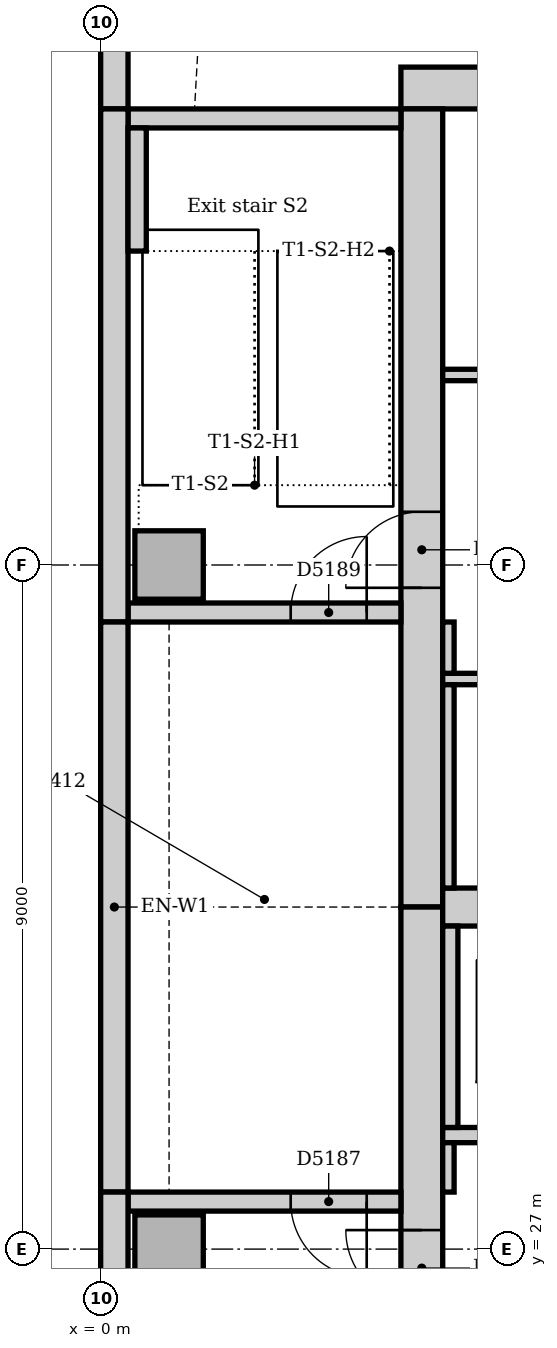
"""IFC4 building model, lengths in metres.
Left out: names, types, materials, properties, quantities, classifications, styles, units other than length and angle.
Written with IfcOpenShell. Run it as: python <this file> out.ifc"""

import sys

from ifc_helpers import new_model, si_unit, direction, frame, frame_2d, origin, origin_2d, place, context, subcontext, project, spatial, rectangle, extrude, element, fill, save


model = new_model("IFC4")
c1 = context("Model", 3, precision=1e-05, world=origin(), true_north=direction((0.0, 1.0)))
c2 = subcontext(c1, "Body", "Model", "MODEL_VIEW")
j1 = project(units=[si_unit("LENGTHUNIT", "METRE"), si_unit("PLANEANGLEUNIT", "RADIAN")], contexts=[c1])
p1 = place(None, origin())
s1 = spatial("IfcSite", under=j1, at=p1, CompositionType="ELEMENT")
p2 = place(p1, origin())
s2 = spatial("IfcBuilding", under=s1, at=p2, CompositionType="ELEMENT")
p3 = place(p2, frame((0.0, 0.0, 226.0)))
s3 = spatial("IfcBuildingStorey", under=s2, at=p3, CompositionType="ELEMENT", Elevation=226.0)
p4 = place(p3, frame((23.05, 42.275, 0.0), z_axis=(0.0, 0.0, 1.0), x_axis=(-1.0, 0.0, 0.0)))
e1 = element("IfcWall", 1, at=p4, inside=s3, PredefinedType="SOLIDWALL", context=c2, shape_type="SweptSolid", body=[
    extrude(rectangle(XDim=19.1, YDim=0.55, at=frame_2d((9.55, 0.0))), origin(), (0.0, 0.0, 1.0), 4.0),
])
p5 = place(p3, frame((4.225, 42.0, 0.0), z_axis=(0.0, 0.0, 1.0), x_axis=(0.0, -1.0, 0.0)))
e2 = element("IfcWall", 2, at=p5, inside=s3, PredefinedType="SOLIDWALL", context=c2, shape_type="SweptSolid", body=[
    extrude(rectangle(XDim=10.5, YDim=0.55, at=frame_2d((5.25, 0.0))), origin(), (0.0, 0.0, 1.0), 4.0),
])
p6 = place(p5, frame((5.3, 0.0, 0.0)))
e3 = element("IfcOpeningElement", 3, at=p6, cuts=e2, PredefinedType="OPENING", context=c2, shape_type="SweptSolid", body=[
    extrude(rectangle(XDim=1.0, YDim=2.1, at=frame_2d((0.5, 1.05))), frame((0.0, 0.285, 0.0), z_axis=(0.0, -1.0, 0.0), x_axis=(1.0, 0.0, 0.0)), (0.0, 0.0, 1.0), 0.57),
])
p7 = place(p3, frame((4.225, 31.5, 0.0), z_axis=(0.0, 0.0, 1.0), x_axis=(0.0, -1.0, 0.0)))
e4 = element("IfcWall", 4, at=p7, inside=s3, PredefinedType="SOLIDWALL", context=c2, shape_type="SweptSolid", body=[
    extrude(rectangle(XDim=10.5, YDim=0.55, at=frame_2d((5.25, 0.0))), origin(), (0.0, 0.0, 1.0), 4.0),
])
p8 = place(p7, frame((4.25, 0.0, 0.0)))
e5 = element("IfcOpeningElement", 5, at=p8, cuts=e4, PredefinedType="OPENING", context=c2, shape_type="SweptSolid", body=[
    extrude(rectangle(XDim=1.0, YDim=2.1, at=frame_2d((0.5, 1.05))), frame((0.0, 0.285, 0.0), z_axis=(0.0, -1.0, 0.0), x_axis=(1.0, 0.0, 0.0)), (0.0, 0.0, 1.0), 0.57),
])
p9 = place(p3, frame((4.5, 31.5, 0.0), z_axis=(0.0, 0.0, 1.0), x_axis=(1.0, 0.0, 0.0)))
e6 = element("IfcWall", 6, at=p9, inside=s3, PredefinedType="SOLIDWALL", context=c2, shape_type="SweptSolid", body=[
    extrude(rectangle(XDim=18.0, YDim=0.5, at=frame_2d((9.0, 0.0))), origin(), (0.0, 0.0, 1.0), 4.0),
])
p10 = place(p3, frame((3.95, 27.625, 0.0), z_axis=(0.0, 0.0, 1.0), x_axis=(-1.0, 0.0, 0.0)))
e7 = element("IfcWall", 7, at=p10, inside=s3, PredefinedType="SOLIDWALL", context=c2, shape_type="SweptSolid", body=[
    extrude(rectangle(XDim=3.59, YDim=0.25, at=frame_2d((1.795, 0.0))), origin(), (0.0, 0.0, 1.0), 4.0),
])
p11 = place(p10, frame((0.45, 0.0, 0.0)))
e8 = element("IfcOpeningElement", 8, at=p11, cuts=e7, PredefinedType="OPENING", context=c2, shape_type="SweptSolid", body=[
    extrude(rectangle(XDim=1.0, YDim=2.1, at=frame_2d((0.5, 1.05))), frame((0.0, 0.135, 0.0), z_axis=(0.0, -1.0, 0.0), x_axis=(1.0, 0.0, 0.0)), (0.0, 0.0, 1.0), 0.27),
])
p12 = place(p3, frame((0.36, 35.375, 0.0), z_axis=(0.0, 0.0, 1.0), x_axis=(1.0, 0.0, 0.0)))
e9 = element("IfcWall", 9, at=p12, inside=s3, PredefinedType="SOLIDWALL", context=c2, shape_type="SweptSolid", body=[
    extrude(rectangle(XDim=3.59, YDim=0.25, at=frame_2d((1.795, 0.0))), origin(), (0.0, 0.0, 1.0), 4.0),
])
p13 = place(p12, frame((2.14, 0.0, 0.0)))
e10 = element("IfcOpeningElement", 10, at=p13, cuts=e9, PredefinedType="OPENING", context=c2, shape_type="SweptSolid", body=[
    extrude(rectangle(XDim=1.0, YDim=2.1, at=frame_2d((0.5, 1.05))), frame((0.0, 0.135, 0.0), z_axis=(0.0, -1.0, 0.0), x_axis=(1.0, 0.0, 0.0)), (0.0, 0.0, 1.0), 0.27),
])
p14 = place(p3, frame((3.95, 41.875, 0.0), z_axis=(0.0, 0.0, 1.0), x_axis=(-1.0, 0.0, 0.0)))
e11 = element("IfcWall", 11, at=p14, inside=s3, PredefinedType="SOLIDWALL", context=c2, shape_type="SweptSolid", body=[
    extrude(rectangle(XDim=3.59, YDim=0.25, at=frame_2d((1.795, 0.0))), origin(), (0.0, 0.0, 1.0), 4.0),
])
for number, where, z_axis, x_axis in (
    (12, (0.9, 27.0, 0.0), (0.0, 0.0, 1.0), (1.0, 0.0, 0.0)),
    (13, (0.9, 36.0, 0.0), (0.0, 0.0, 1.0), (1.0, 0.0, 0.0)),
):
    element("IfcColumn", number, at=place(p3, frame(where, z_axis=z_axis, x_axis=x_axis)), inside=s3, PredefinedType="COLUMN", context=c2, shape_type="SweptSolid", body=[
        extrude(rectangle(XDim=0.9, YDim=0.9, at=origin_2d()), origin(), (0.0, 0.0, 1.0), 4.0),
    ])
p15 = place(p3, frame((0.18, 54.257, 0.0), z_axis=(0.0, 0.0, 1.0), x_axis=(0.0, -1.0, 0.0)))
e14 = element("IfcWall", 14, at=p15, inside=s3, PredefinedType="STANDARD", context=c2, shape_type="SweptSolid", body=[
    extrude(rectangle(XDim=12.257, YDim=0.36, at=frame_2d((6.129, 0.0))), origin(), (0.0, 0.0, 1.0), 3.85),
])
p16 = place(p15, frame((3.107, 0.0, 0.9)))
e15 = element("IfcOpeningElement", 15, at=p16, cuts=e14, PredefinedType="OPENING", context=c2, shape_type="SweptSolid", body=[
    extrude(rectangle(XDim=3.3, YDim=1.6, at=frame_2d((1.65, 0.8))), frame((0.0, 0.19, 0.0), z_axis=(0.0, -1.0, 0.0), x_axis=(1.0, 0.0, 0.0)), (0.0, 0.0, 1.0), 0.38),
])
p17 = place(p15, frame((7.607, 0.0, 0.9)))
e16 = element("IfcOpeningElement", 16, at=p17, cuts=e14, PredefinedType="OPENING", context=c2, shape_type="SweptSolid", body=[
    extrude(rectangle(XDim=3.3, YDim=1.6, at=frame_2d((1.65, 0.8))), frame((0.0, 0.19, 0.0), z_axis=(0.0, -1.0, 0.0), x_axis=(1.0, 0.0, 0.0)), (0.0, 0.0, 1.0), 0.38),
])
p18 = place(p3, frame((0.18, 42.0, 0.0), z_axis=(0.0, 0.0, 1.0), x_axis=(0.0, -1.0, 0.0)))
e17 = element("IfcWall", 17, at=p18, inside=s3, PredefinedType="STANDARD", context=c2, shape_type="SweptSolid", body=[
    extrude(rectangle(XDim=6.75, YDim=0.36, at=frame_2d((3.375, 0.0))), origin(), (0.0, 0.0, 1.0), 3.85),
])
p19 = place(p3, frame((0.18, 35.25, 0.0), z_axis=(0.0, 0.0, 1.0), x_axis=(0.0, -1.0, 0.0)))
e18 = element("IfcWall", 18, at=p19, inside=s3, PredefinedType="STANDARD", context=c2, shape_type="SweptSolid", body=[
    extrude(rectangle(XDim=7.5, YDim=0.36, at=frame_2d((3.75, 0.0))), origin(), (0.0, 0.0, 1.0), 3.85),
])
p20 = place(p3, frame((0.18, 27.75, 0.0), z_axis=(0.0, 0.0, 1.0), x_axis=(0.0, -1.0, 0.0)))
e19 = element("IfcWall", 19, at=p20, inside=s3, PredefinedType="STANDARD", context=c2, shape_type="SweptSolid", body=[
    extrude(rectangle(XDim=6.75, YDim=0.36, at=frame_2d((3.375, 0.0))), origin(), (0.0, 0.0, 1.0), 3.85),
])
p21 = place(p3, frame((0.48, 40.13, 0.0), z_axis=(0.0, 0.0, 1.0), x_axis=(0.0, 1.0, 0.0)))
e20 = element("IfcWall", 20, at=p21, inside=s3, PredefinedType="STANDARD", context=c2, shape_type="SweptSolid", body=[
    extrude(rectangle(XDim=1.62, YDim=0.24, at=frame_2d((0.81, 0.0))), origin(), (0.0, 0.0, 1.0), 4.0),
])
p22 = place(p3, frame((4.5, 28.5, 0.0), z_axis=(0.0, 0.0, 1.0), x_axis=(1.0, 0.0, 0.0)))
e21 = element("IfcWall", 21, at=p22, inside=s3, PredefinedType="PARTITIONING", context=c2, shape_type="SweptSolid", body=[
    extrude(rectangle(XDim=18.0, YDim=0.2, at=frame_2d((9.0, 0.0))), origin(), (0.0, 0.0, 1.0), 3.85),
])
p23 = place(p22, frame((0.95, 0.0, 0.0)))
e22 = element("IfcOpeningElement", 22, at=p23, cuts=e21, PredefinedType="OPENING", context=c2, shape_type="SweptSolid", body=[
    extrude(rectangle(XDim=1.1, YDim=2.1, at=frame_2d((0.55, 1.05))), frame((0.0, 0.11, 0.0), z_axis=(0.0, -1.0, 0.0), x_axis=(1.0, 0.0, 0.0)), (0.0, 0.0, 1.0), 0.22),
])
p24 = place(p22, frame((3.95, 0.0, 0.0)))
e23 = element("IfcOpeningElement", 23, at=p24, cuts=e21, PredefinedType="OPENING", context=c2, shape_type="SweptSolid", body=[
    extrude(rectangle(XDim=1.1, YDim=2.1, at=frame_2d((0.55, 1.05))), frame((0.0, 0.11, 0.0), z_axis=(0.0, -1.0, 0.0), x_axis=(1.0, 0.0, 0.0)), (0.0, 0.0, 1.0), 0.22),
])
p25 = place(p22, frame((6.95, 0.0, 0.0)))
e24 = element("IfcOpeningElement", 24, at=p25, cuts=e21, PredefinedType="OPENING", context=c2, shape_type="SweptSolid", body=[
    extrude(rectangle(XDim=1.1, YDim=2.1, at=frame_2d((0.55, 1.05))), frame((0.0, 0.11, 0.0), z_axis=(0.0, -1.0, 0.0), x_axis=(1.0, 0.0, 0.0)), (0.0, 0.0, 1.0), 0.22),
])
p26 = place(p22, frame((9.95, 0.0, 0.0)))
e25 = element("IfcOpeningElement", 25, at=p26, cuts=e21, PredefinedType="OPENING", context=c2, shape_type="SweptSolid", body=[
    extrude(rectangle(XDim=1.1, YDim=2.1, at=frame_2d((0.55, 1.05))), frame((0.0, 0.11, 0.0), z_axis=(0.0, -1.0, 0.0), x_axis=(1.0, 0.0, 0.0)), (0.0, 0.0, 1.0), 0.22),
])
p27 = place(p22, frame((12.95, 0.0, 0.0)))
e26 = element("IfcOpeningElement", 26, at=p27, cuts=e21, PredefinedType="OPENING", context=c2, shape_type="SweptSolid", body=[
    extrude(rectangle(XDim=1.1, YDim=2.1, at=frame_2d((0.55, 1.05))), frame((0.0, 0.11, 0.0), z_axis=(0.0, -1.0, 0.0), x_axis=(1.0, 0.0, 0.0)), (0.0, 0.0, 1.0), 0.22),
])
p28 = place(p22, frame((15.95, 0.0, 0.0)))
e27 = element("IfcOpeningElement", 27, at=p28, cuts=e21, PredefinedType="OPENING", context=c2, shape_type="SweptSolid", body=[
    extrude(rectangle(XDim=1.1, YDim=2.1, at=frame_2d((0.55, 1.05))), frame((0.0, 0.11, 0.0), z_axis=(0.0, -1.0, 0.0), x_axis=(1.0, 0.0, 0.0)), (0.0, 0.0, 1.0), 0.22),
])
p29 = place(p3, frame((4.6, 28.6, 0.0), z_axis=(0.0, 0.0, 1.0), x_axis=(0.0, 1.0, 0.0)))
e28 = element("IfcWall", 28, at=p29, inside=s3, PredefinedType="PARTITIONING", context=c2, shape_type="SweptSolid", body=[
    extrude(rectangle(XDim=2.65, YDim=0.2, at=frame_2d((1.325, 0.0))), origin(), (0.0, 0.0, 1.0), 3.85),
])
p30 = place(p3, frame((4.5, 38.5, 0.0), z_axis=(0.0, 0.0, 1.0), x_axis=(1.0, 0.0, 0.0)))
e29 = element("IfcWall", 29, at=p30, inside=s3, PredefinedType="PARTITIONING", context=c2, shape_type="SweptSolid", body=[
    extrude(rectangle(XDim=11.9, YDim=0.15, at=frame_2d((5.95, 0.0))), origin(), (0.0, 0.0, 1.0), 3.85),
])
p31 = place(p30, frame((1.85, 0.0, 0.0)))
e30 = element("IfcOpeningElement", 30, at=p31, cuts=e29, PredefinedType="OPENING", context=c2, shape_type="SweptSolid", body=[
    extrude(rectangle(XDim=0.9, YDim=2.1, at=frame_2d((0.45, 1.05))), frame((0.0, 0.085, 0.0), z_axis=(0.0, -1.0, 0.0), x_axis=(1.0, 0.0, 0.0)), (0.0, 0.0, 1.0), 0.17),
])
p32 = place(p30, frame((5.55, 0.0, 0.0)))
e31 = element("IfcOpeningElement", 31, at=p32, cuts=e29, PredefinedType="OPENING", context=c2, shape_type="SweptSolid", body=[
    extrude(rectangle(XDim=0.9, YDim=2.1, at=frame_2d((0.45, 1.05))), frame((0.0, 0.085, 0.0), z_axis=(0.0, -1.0, 0.0), x_axis=(1.0, 0.0, 0.0)), (0.0, 0.0, 1.0), 0.17),
])
p33 = place(p30, frame((7.8, 0.0, 0.0)))
e32 = element("IfcOpeningElement", 32, at=p33, cuts=e29, PredefinedType="OPENING", context=c2, shape_type="SweptSolid", body=[
    extrude(rectangle(XDim=0.9, YDim=2.1, at=frame_2d((0.45, 1.05))), frame((0.0, 0.085, 0.0), z_axis=(0.0, -1.0, 0.0), x_axis=(1.0, 0.0, 0.0)), (0.0, 0.0, 1.0), 0.17),
])
p34 = place(p30, frame((9.95, 0.0, 0.0)))
e33 = element("IfcOpeningElement", 33, at=p34, cuts=e29, PredefinedType="OPENING", context=c2, shape_type="SweptSolid", body=[
    extrude(rectangle(XDim=0.8, YDim=2.1, at=frame_2d((0.4, 1.05))), frame((0.0, 0.085, 0.0), z_axis=(0.0, -1.0, 0.0), x_axis=(1.0, 0.0, 0.0)), (0.0, 0.0, 1.0), 0.17),
])
p35 = place(p3, frame((4.5, 34.5, 0.0), z_axis=(0.0, 0.0, 1.0), x_axis=(1.0, 0.0, 0.0)))
e34 = element("IfcWall", 34, at=p35, inside=s3, PredefinedType="PARTITIONING", context=c2, shape_type="SweptSolid", body=[
    extrude(rectangle(XDim=5.9, YDim=0.15, at=frame_2d((2.95, 0.0))), origin(), (0.0, 0.0, 1.0), 3.85),
])
p36 = place(p35, frame((2.5, 0.0, 0.0)))
e35 = element("IfcOpeningElement", 35, at=p36, cuts=e34, PredefinedType="OPENING", context=c2, shape_type="SweptSolid", body=[
    extrude(rectangle(XDim=0.9, YDim=2.1, at=frame_2d((0.45, 1.05))), frame((0.0, 0.085, 0.0), z_axis=(0.0, -1.0, 0.0), x_axis=(1.0, 0.0, 0.0)), (0.0, 0.0, 1.0), 0.17),
])
p37 = place(p3, frame((4.575, 34.575, 0.0), z_axis=(0.0, 0.0, 1.0), x_axis=(0.0, 1.0, 0.0)))
e36 = element("IfcWall", 36, at=p37, inside=s3, PredefinedType="PARTITIONING", context=c2, shape_type="SweptSolid", body=[
    extrude(rectangle(XDim=0.675, YDim=0.15, at=frame_2d((0.338, 0.0))), origin(), (0.0, 0.0, 1.0), 3.85),
])
p38 = place(p3, frame((4.575, 31.75, 0.0), z_axis=(0.0, 0.0, 1.0), x_axis=(0.0, 1.0, 0.0)))
e37 = element("IfcWall", 37, at=p38, inside=s3, PredefinedType="PARTITIONING", context=c2, shape_type="SweptSolid", body=[
    extrude(rectangle(XDim=2.675, YDim=0.15, at=frame_2d((1.337, 0.0))), origin(), (0.0, 0.0, 1.0), 3.85),
])
p39 = place(p3, frame((4.575, 27.75, 0.0), z_axis=(0.0, 0.0, 1.0), x_axis=(0.0, 1.0, 0.0)))
e38 = element("IfcWall", 38, at=p39, inside=s3, PredefinedType="PARTITIONING", context=c2, shape_type="SweptSolid", body=[
    extrude(rectangle(XDim=0.65, YDim=0.15, at=frame_2d((0.325, 0.0))), origin(), (0.0, 0.0, 1.0), 3.85),
])
p40 = place(p8, frame((1.0, 0.0, 0.0), z_axis=(0.0, 0.0, 1.0), x_axis=(-1.0, 0.0, 0.0)))
e39 = element("IfcDoor", 39, at=p40, inside=s3, OperationType="SINGLE_SWING_RIGHT", PredefinedType="DOOR", context=c2, shape_type="SweptSolid", body=[
    extrude(rectangle(XDim=1.0, YDim=2.1, at=frame_2d((0.5, 1.05))), frame((0.0, 0.025, 0.0), z_axis=(0.0, -1.0, 0.0), x_axis=(1.0, 0.0, 0.0)), (0.0, 0.0, 1.0), 0.05),
])
fill(e5, e39)
p41 = place(p11, origin())
e40 = element("IfcDoor", 40, at=p41, inside=s3, OperationType="SINGLE_SWING_LEFT", PredefinedType="DOOR", context=c2, shape_type="SweptSolid", body=[
    extrude(rectangle(XDim=1.0, YDim=2.1, at=frame_2d((0.5, 1.05))), frame((0.0, 0.025, 0.0), z_axis=(0.0, -1.0, 0.0), x_axis=(1.0, 0.0, 0.0)), (0.0, 0.0, 1.0), 0.05),
])
fill(e8, e40)
p42 = place(p6, frame((1.0, 0.0, 0.0), z_axis=(0.0, 0.0, 1.0), x_axis=(-1.0, 0.0, 0.0)))
e41 = element("IfcDoor", 41, at=p42, inside=s3, OperationType="SINGLE_SWING_LEFT", PredefinedType="DOOR", context=c2, shape_type="SweptSolid", body=[
    extrude(rectangle(XDim=1.0, YDim=2.1, at=frame_2d((0.5, 1.05))), frame((0.0, 0.025, 0.0), z_axis=(0.0, -1.0, 0.0), x_axis=(1.0, 0.0, 0.0)), (0.0, 0.0, 1.0), 0.05),
])
fill(e3, e41)
p43 = place(p13, origin())
e42 = element("IfcDoor", 42, at=p43, inside=s3, OperationType="SINGLE_SWING_RIGHT", PredefinedType="DOOR", context=c2, shape_type="SweptSolid", body=[
    extrude(rectangle(XDim=1.0, YDim=2.1, at=frame_2d((0.5, 1.05))), frame((0.0, 0.025, 0.0), z_axis=(0.0, -1.0, 0.0), x_axis=(1.0, 0.0, 0.0)), (0.0, 0.0, 1.0), 0.05),
])
fill(e10, e42)
save(model, sys.argv[1])
